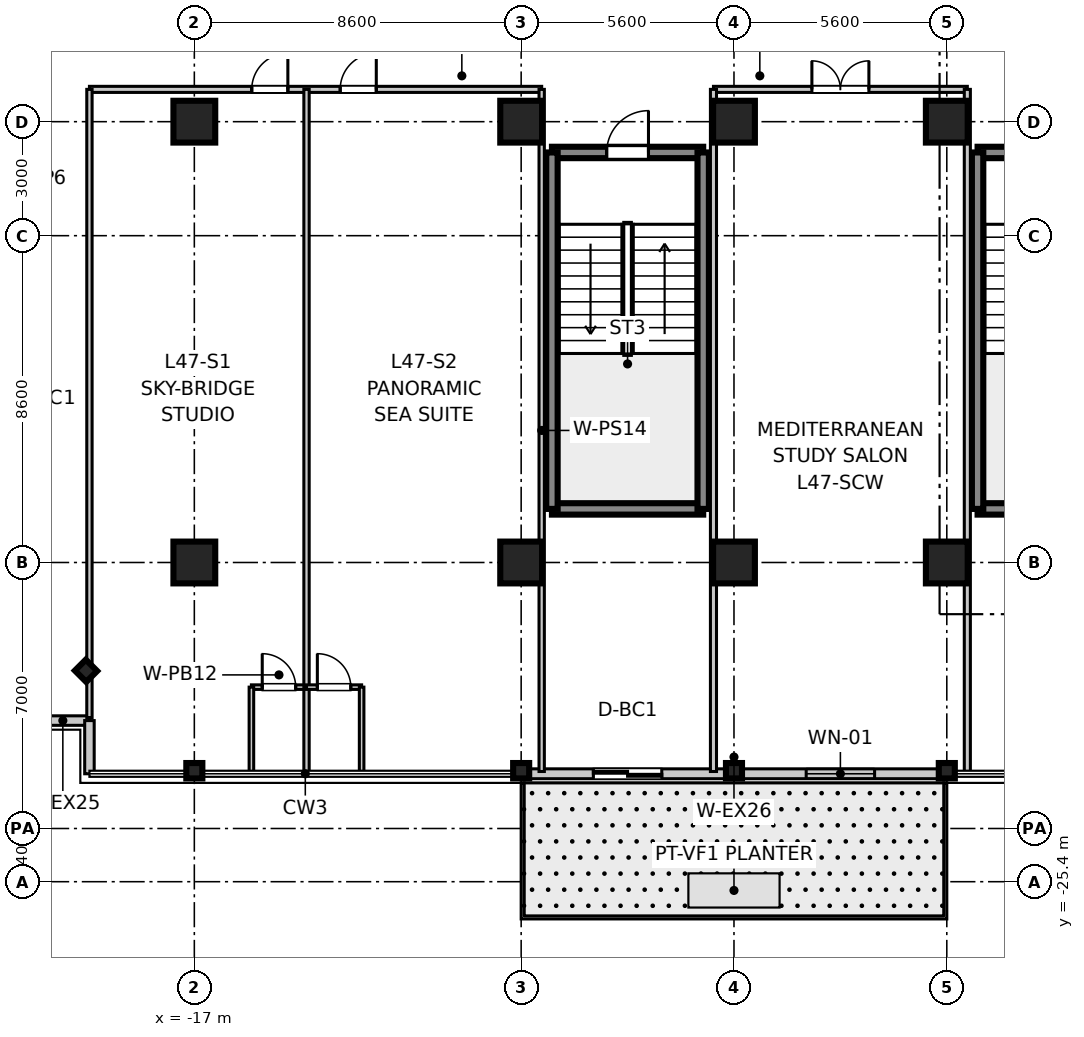
"""IFC4 building model, lengths in metres.
Left out: names, types, materials, properties, quantities, classifications, styles, units other than length and angle.
Written with IfcOpenShell. Run it as: python <this file> out.ifc"""

import sys

from ifc_helpers import new_model, si_unit, direction, frame, frame_2d, origin, origin_2d, place, context, subcontext, project, spatial, rectangle, i_section, extrude, source, transform, mapped, element, fill, save


model = new_model("IFC4")
c1 = context("Model", 3, precision=1e-05, world=origin(), true_north=direction((0.0, 1.0)))
c2 = subcontext(c1, "Body", "Model", "MODEL_VIEW")
j1 = project(units=[si_unit("LENGTHUNIT", "METRE"), si_unit("PLANEANGLEUNIT", "RADIAN")], contexts=[c1])
p1 = place(None, origin())
s1 = spatial("IfcSite", under=j1, at=p1, CompositionType="ELEMENT")
p2 = place(p1, origin())
s2 = spatial("IfcBuilding", under=s1, at=p2, CompositionType="ELEMENT")
p3 = place(p2, frame((0.0, 0.0, 185.5)))
s3 = spatial("IfcBuildingStorey", under=s2, at=p3, CompositionType="ELEMENT", Elevation=185.5)
m1 = source(origin(), c2, "Body", "SweptSolid", [
    extrude(rectangle(XDim=1.1, YDim=1.1, at=origin_2d()), origin(), (0.0, 0.0, 1.0), 3.605),
])
for number, where, z_axis, x_axis in (
    (1, (-17.0, -17.0, 0.0), (0.0, 0.0, 1.0), (1.0, 0.0, 0.0)),
    (2, (-17.0, -5.4, 0.0), (0.0, 0.0, 1.0), (1.0, 0.0, 0.0)),
    (3, (-8.4, -17.0, 0.0), (0.0, 0.0, 1.0), (1.0, 0.0, 0.0)),
    (4, (-8.4, -5.4, 0.0), (0.0, 0.0, 1.0), (1.0, 0.0, 0.0)),
    (5, (-2.8, -17.0, 0.0), (0.0, 0.0, 1.0), (1.0, 0.0, 0.0)),
    (6, (-2.8, -5.4, 0.0), (0.0, 0.0, 1.0), (1.0, 0.0, 0.0)),
    (7, (2.8, -17.0, 0.0), (0.0, 0.0, 1.0), (1.0, 0.0, 0.0)),
    (8, (2.8, -5.4, 0.0), (0.0, 0.0, 1.0), (1.0, 0.0, 0.0)),
):
    element("IfcColumn", number, at=place(p3, frame(where, z_axis=z_axis, x_axis=x_axis)), inside=s3, PredefinedType="COLUMN", context=c2, shape_type="MappedRepresentation", body=[
        mapped(m1, transform((0.0, 0.0, 0.0), scale=1.0)),
    ])
m2 = source(origin(), c2, "Body", "SweptSolid", [
    extrude(i_section(OverallWidth=0.406, OverallDepth=0.422, WebThickness=0.019, FlangeThickness=0.03, at=origin_2d()), origin(), (0.0, 0.0, 1.0), 3.605),
])
for number, where, z_axis, x_axis in (
    (9, (-17.0, -22.48, 0.0), (0.0, 0.0, 1.0), (0.0, 1.0, 0.0)),
    (10, (-8.4, -22.48, 0.0), (0.0, 0.0, 1.0), (0.0, 1.0, 0.0)),
    (11, (-2.8, -22.48, 0.0), (0.0, 0.0, 1.0), (0.0, 1.0, 0.0)),
    (12, (2.8, -22.48, 0.0), (0.0, 0.0, 1.0), (0.0, 1.0, 0.0)),
    (13, (-19.85, -19.85, 0.0), (0.0, 0.0, 1.0), (0.707, 0.707, 0.0)),
):
    element("IfcColumn", number, at=place(p3, frame(where, z_axis=z_axis, x_axis=x_axis)), inside=s3, PredefinedType="COLUMN", context=c2, shape_type="MappedRepresentation", body=[
        mapped(m2, transform((0.0, 0.0, 0.0), scale=1.0)),
    ])
m3 = source(origin(), c2, "Body", "SweptSolid", [
    extrude(rectangle(XDim=3.98, YDim=0.3, at=frame_2d((1.99, 0.0))), origin(), (0.0, 0.0, 1.0), 3.39),
])
for number, where, z_axis, x_axis in (
    (14, (3.61, -15.59, 0.0), (0.0, 0.0, 1.0), (1.0, 0.0, 0.0)),
    (15, (3.61, -6.21, 0.0), (0.0, 0.0, 1.0), (1.0, 0.0, 0.0)),
):
    element("IfcWall", number, at=place(p3, frame(where, z_axis=z_axis, x_axis=x_axis)), inside=s3, PredefinedType="SHEAR", context=c2, shape_type="MappedRepresentation", body=[
        mapped(m3, transform((0.0, 0.0, 0.0), scale=1.0)),
    ])
m4 = source(origin(), c2, "Body", "SweptSolid", [
    extrude(rectangle(XDim=9.38, YDim=0.3, at=frame_2d((4.69, 0.0))), origin(), (0.0, 0.0, 1.0), 3.39),
])
p4 = place(p3, frame((3.61, -15.59, 0.0), z_axis=(0.0, 0.0, 1.0), x_axis=(0.0, 1.0, 0.0)))
e16 = element("IfcWall", 16, at=p4, inside=s3, PredefinedType="SHEAR", context=c2, shape_type="MappedRepresentation", body=[
    mapped(m4, transform((0.0, 0.0, 0.0), scale=1.0)),
])
p5 = place(p3, frame((-7.59, -15.59, 0.0), z_axis=(0.0, 0.0, 1.0), x_axis=(1.0, 0.0, 0.0)))
e17 = element("IfcWall", 17, at=p5, inside=s3, PredefinedType="SHEAR", context=c2, shape_type="MappedRepresentation", body=[
    mapped(m3, transform((0.0, 0.0, 0.0), scale=1.0)),
])
p6 = place(p3, frame((-7.59, -6.21, 0.0), z_axis=(0.0, 0.0, 1.0), x_axis=(1.0, 0.0, 0.0)))
e18 = element("IfcWall", 18, at=p6, inside=s3, PredefinedType="SHEAR", context=c2, shape_type="MappedRepresentation", body=[
    mapped(m3, transform((0.0, 0.0, 0.0), scale=1.0)),
])
p7 = place(p6, frame((1.44, 0.0, 0.0)))
e19 = element("IfcOpeningElement", 19, at=p7, cuts=e18, PredefinedType="OPENING", context=c2, shape_type="SweptSolid", body=[
    extrude(rectangle(XDim=1.1, YDim=2.15, at=frame_2d((0.55, 1.075))), frame((0.0, 0.16, 0.0), z_axis=(0.0, -1.0, 0.0), x_axis=(1.0, 0.0, 0.0)), (0.0, 0.0, 1.0), 0.32),
])
for number, where, z_axis, x_axis in (
    (20, (-7.59, -15.59, 0.0), (0.0, 0.0, 1.0), (0.0, 1.0, 0.0)),
    (21, (-3.61, -15.59, 0.0), (0.0, 0.0, 1.0), (0.0, 1.0, 0.0)),
):
    element("IfcWall", number, at=place(p3, frame(where, z_axis=z_axis, x_axis=x_axis)), inside=s3, PredefinedType="SHEAR", context=c2, shape_type="MappedRepresentation", body=[
        mapped(m4, transform((0.0, 0.0, 0.0), scale=1.0)),
    ])
m5 = source(origin(), c2, "Body", "SweptSolid", [
    extrude(rectangle(XDim=1.4, YDim=0.25, at=frame_2d((0.7, 0.0))), origin(), (0.0, 0.0, 1.0), 3.39),
])
p8 = place(p3, frame((-21.16, -21.16, 0.0), z_axis=(0.0, 0.0, 1.0), x_axis=(1.0, 0.0, 0.0)))
e22 = element("IfcWall", 22, at=p8, inside=s3, PredefinedType="STANDARD", context=c2, shape_type="MappedRepresentation", body=[
    mapped(m5, transform((0.0, 0.0, 0.0), scale=1.0)),
])
m6 = source(origin(), c2, "Body", "SweptSolid", [
    extrude(rectangle(XDim=1.4, YDim=0.25, at=frame_2d((0.7, 0.0))), origin(), (0.0, 0.0, 1.0), 3.39),
])
p9 = place(p3, frame((-19.76, -22.56, 0.0), z_axis=(0.0, 0.0, 1.0), x_axis=(0.0, 1.0, 0.0)))
e23 = element("IfcWall", 23, at=p9, inside=s3, PredefinedType="STANDARD", context=c2, shape_type="MappedRepresentation", body=[
    mapped(m6, transform((0.0, 0.0, 0.0), scale=1.0)),
])
m7 = source(origin(), c2, "Body", "SweptSolid", [
    extrude(rectangle(XDim=11.2, YDim=0.26, at=frame_2d((5.6, 0.0))), origin(), (0.0, 0.0, 1.0), 2.87),
])
p10 = place(p3, frame((-8.4, -22.56, 0.0), z_axis=(0.0, 0.0, 1.0), x_axis=(1.0, 0.0, 0.0)))
e24 = element("IfcWall", 24, at=p10, inside=s3, PredefinedType="STANDARD", context=c2, shape_type="MappedRepresentation", body=[
    mapped(m7, transform((0.0, 0.0, 0.0), scale=1.0)),
])
p11 = place(p10, frame((1.9, 0.0, 0.0)))
e25 = element("IfcOpeningElement", 25, at=p11, cuts=e24, PredefinedType="OPENING", context=c2, shape_type="SweptSolid", body=[
    extrude(rectangle(XDim=1.8, YDim=2.25, at=frame_2d((0.9, 1.125))), frame((0.0, 0.14, 0.0), z_axis=(0.0, -1.0, 0.0), x_axis=(1.0, 0.0, 0.0)), (0.0, 0.0, 1.0), 0.28),
])
p12 = place(p10, frame((7.5, 0.0, 0.85)))
e26 = element("IfcOpeningElement", 26, at=p12, cuts=e24, PredefinedType="OPENING", context=c2, shape_type="SweptSolid", body=[
    extrude(rectangle(XDim=1.8, YDim=1.5, at=frame_2d((0.9, 0.75))), frame((0.0, 0.14, 0.0), z_axis=(0.0, -1.0, 0.0), x_axis=(1.0, 0.0, 0.0)), (0.0, 0.0, 1.0), 0.28),
])
m8 = source(origin(), c2, "Body", "SweptSolid", [
    extrude(rectangle(XDim=11.9, YDim=0.16, at=frame_2d((5.95, 0.0))), origin(), (0.0, 0.0, 1.0), 2.73),
])
p13 = place(p3, frame((-19.76, -4.55, 0.0), z_axis=(0.0, 0.0, 1.0), x_axis=(1.0, 0.0, 0.0)))
e27 = element("IfcWall", 27, at=p13, inside=s3, PredefinedType="PARTITIONING", context=c2, shape_type="MappedRepresentation", body=[
    mapped(m8, transform((0.0, 0.0, 0.0), scale=1.0)),
])
p14 = place(p13, frame((4.271, 0.0, 0.0)))
e28 = element("IfcOpeningElement", 28, at=p14, cuts=e27, PredefinedType="OPENING", context=c2, shape_type="SweptSolid", body=[
    extrude(rectangle(XDim=0.95, YDim=2.1, at=frame_2d((0.475, 1.05))), frame((0.0, 0.09, 0.0), z_axis=(0.0, -1.0, 0.0), x_axis=(1.0, 0.0, 0.0)), (0.0, 0.0, 1.0), 0.18),
])
p15 = place(p13, frame((6.598, 0.0, 0.0)))
e29 = element("IfcOpeningElement", 29, at=p15, cuts=e27, PredefinedType="OPENING", context=c2, shape_type="SweptSolid", body=[
    extrude(rectangle(XDim=0.95, YDim=2.1, at=frame_2d((0.475, 1.05))), frame((0.0, 0.09, 0.0), z_axis=(0.0, -1.0, 0.0), x_axis=(1.0, 0.0, 0.0)), (0.0, 0.0, 1.0), 0.18),
])
m9 = source(origin(), c2, "Body", "SweptSolid", [
    extrude(rectangle(XDim=16.53, YDim=0.14, at=frame_2d((8.265, 0.0))), origin(), (0.0, 0.0, 1.0), 2.73),
])
p16 = place(p3, frame((-19.76, -21.08, 0.0), z_axis=(0.0, 0.0, 1.0), x_axis=(0.0, 1.0, 0.0)))
e30 = element("IfcWall", 30, at=p16, inside=s3, PredefinedType="PARTITIONING", context=c2, shape_type="MappedRepresentation", body=[
    mapped(m9, transform((0.0, 0.0, 0.0), scale=1.0)),
])
m10 = source(origin(), c2, "Body", "SweptSolid", [
    extrude(rectangle(XDim=17.95, YDim=0.14, at=frame_2d((8.975, 0.0))), origin(), (0.0, 0.0, 1.0), 2.73),
])
p17 = place(p3, frame((-7.86, -22.5, 0.0), z_axis=(0.0, 0.0, 1.0), x_axis=(0.0, 1.0, 0.0)))
e31 = element("IfcWall", 31, at=p17, inside=s3, PredefinedType="PARTITIONING", context=c2, shape_type="MappedRepresentation", body=[
    mapped(m10, transform((0.0, 0.0, 0.0), scale=1.0)),
])
m11 = source(origin(), c2, "Body", "SweptSolid", [
    extrude(rectangle(XDim=1.45, YDim=0.12, at=frame_2d((0.725, 0.0))), origin(), (0.0, 0.0, 1.0), 2.73),
])
p18 = place(p3, frame((-15.498, -20.28, 0.0), z_axis=(0.0, 0.0, 1.0), x_axis=(1.0, 0.0, 0.0)))
e32 = element("IfcWall", 32, at=p18, inside=s3, PredefinedType="PARTITIONING", context=c2, shape_type="MappedRepresentation", body=[
    mapped(m11, transform((0.0, 0.0, 0.0), scale=1.0)),
])
p19 = place(p18, frame((0.285, 0.0, 0.0)))
e33 = element("IfcOpeningElement", 33, at=p19, cuts=e32, PredefinedType="OPENING", context=c2, shape_type="SweptSolid", body=[
    extrude(rectangle(XDim=0.88, YDim=2.1, at=frame_2d((0.44, 1.05))), frame((0.0, 0.07, 0.0), z_axis=(0.0, -1.0, 0.0), x_axis=(1.0, 0.0, 0.0)), (0.0, 0.0, 1.0), 0.14),
])
m12 = source(origin(), c2, "Body", "SweptSolid", [
    extrude(rectangle(XDim=2.22, YDim=0.12, at=frame_2d((1.11, 0.0))), origin(), (0.0, 0.0, 1.0), 2.73),
])
p20 = place(p3, frame((-15.498, -22.5, 0.0), z_axis=(0.0, 0.0, 1.0), x_axis=(0.0, 1.0, 0.0)))
e34 = element("IfcWall", 34, at=p20, inside=s3, PredefinedType="PARTITIONING", context=c2, shape_type="MappedRepresentation", body=[
    mapped(m12, transform((0.0, 0.0, 0.0), scale=1.0)),
])
p21 = place(p3, frame((-14.048, -22.5, 0.0), z_axis=(0.0, 0.0, 1.0), x_axis=(0.0, 1.0, 0.0)))
e35 = element("IfcWall", 35, at=p21, inside=s3, PredefinedType="PARTITIONING", context=c2, shape_type="MappedRepresentation", body=[
    mapped(m10, transform((0.0, 0.0, 0.0), scale=1.0)),
])
m13 = source(origin(), c2, "Body", "SweptSolid", [
    extrude(rectangle(XDim=1.45, YDim=0.12, at=frame_2d((0.725, 0.0))), origin(), (0.0, 0.0, 1.0), 2.73),
])
p22 = place(p3, frame((-14.048, -20.28, 0.0), z_axis=(0.0, 0.0, 1.0), x_axis=(1.0, 0.0, 0.0)))
e36 = element("IfcWall", 36, at=p22, inside=s3, PredefinedType="PARTITIONING", context=c2, shape_type="MappedRepresentation", body=[
    mapped(m13, transform((0.0, 0.0, 0.0), scale=1.0)),
])
p23 = place(p22, frame((0.285, 0.0, 0.0)))
e37 = element("IfcOpeningElement", 37, at=p23, cuts=e36, PredefinedType="OPENING", context=c2, shape_type="SweptSolid", body=[
    extrude(rectangle(XDim=0.88, YDim=2.1, at=frame_2d((0.44, 1.05))), frame((0.0, 0.07, 0.0), z_axis=(0.0, -1.0, 0.0), x_axis=(1.0, 0.0, 0.0)), (0.0, 0.0, 1.0), 0.14),
])
p24 = place(p3, frame((-12.598, -22.5, 0.0), z_axis=(0.0, 0.0, 1.0), x_axis=(0.0, 1.0, 0.0)))
e38 = element("IfcWall", 38, at=p24, inside=s3, PredefinedType="PARTITIONING", context=c2, shape_type="MappedRepresentation", body=[
    mapped(m12, transform((0.0, 0.0, 0.0), scale=1.0)),
])
m14 = source(origin(), c2, "Body", "SweptSolid", [
    extrude(rectangle(XDim=6.68, YDim=0.16, at=frame_2d((3.34, 0.0))), origin(), (0.0, 0.0, 1.0), 2.73),
])
p25 = place(p3, frame((-3.34, -4.55, 0.0), z_axis=(0.0, 0.0, 1.0), x_axis=(1.0, 0.0, 0.0)))
e39 = element("IfcWall", 39, at=p25, inside=s3, PredefinedType="PARTITIONING", context=c2, shape_type="MappedRepresentation", body=[
    mapped(m14, transform((0.0, 0.0, 0.0), scale=1.0)),
])
p26 = place(p25, frame((2.59, 0.0, 0.0)))
e40 = element("IfcOpeningElement", 40, at=p26, cuts=e39, PredefinedType="OPENING", context=c2, shape_type="SweptSolid", body=[
    extrude(rectangle(XDim=1.5, YDim=2.15, at=frame_2d((0.75, 1.075))), frame((0.0, 0.09, 0.0), z_axis=(0.0, -1.0, 0.0), x_axis=(1.0, 0.0, 0.0)), (0.0, 0.0, 1.0), 0.18),
])
m15 = source(origin(), c2, "Body", "SweptSolid", [
    extrude(rectangle(XDim=17.95, YDim=0.16, at=frame_2d((8.975, 0.0))), origin(), (0.0, 0.0, 1.0), 2.73),
])
for number, where, z_axis, x_axis in (
    (41, (-3.34, -22.5, 0.0), (0.0, 0.0, 1.0), (0.0, 1.0, 0.0)),
    (42, (3.34, -22.5, 0.0), (0.0, 0.0, 1.0), (0.0, 1.0, 0.0)),
):
    element("IfcWall", number, at=place(p3, frame(where, z_axis=z_axis, x_axis=x_axis)), inside=s3, PredefinedType="PARTITIONING", context=c2, shape_type="MappedRepresentation", body=[
        mapped(m15, transform((0.0, 0.0, 0.0), scale=1.0)),
    ])
m16 = source(origin(), c2, "Body", "SweptSolid", [
    extrude(rectangle(XDim=1.1, YDim=2.15, at=frame_2d((0.55, 1.075))), frame((0.0, 0.025, 0.0), z_axis=(0.0, -1.0, 0.0), x_axis=(1.0, 0.0, 0.0)), (0.0, 0.0, 1.0), 0.05),
])
p27 = place(p7, frame((1.1, 0.0, 0.0), z_axis=(0.0, 0.0, 1.0), x_axis=(-1.0, 0.0, 0.0)))
e43 = element("IfcDoor", 43, at=p27, inside=s3, OperationType="SINGLE_SWING_RIGHT", PredefinedType="DOOR", context=c2, shape_type="MappedRepresentation", body=[
    mapped(m16, transform((0.0, 0.0, 0.0), scale=1.0)),
])
fill(e19, e43)
m17 = source(origin(), c2, "Body", "SweptSolid", [
    extrude(rectangle(XDim=0.88, YDim=2.1, at=frame_2d((0.44, 1.05))), frame((0.0, 0.025, 0.0), z_axis=(0.0, -1.0, 0.0), x_axis=(1.0, 0.0, 0.0)), (0.0, 0.0, 1.0), 0.05),
])
p28 = place(p19, frame((0.88, 0.0, 0.0), z_axis=(0.0, 0.0, 1.0), x_axis=(-1.0, 0.0, 0.0)))
e44 = element("IfcDoor", 44, at=p28, inside=s3, OperationType="SINGLE_SWING_LEFT", PredefinedType="DOOR", context=c2, shape_type="MappedRepresentation", body=[
    mapped(m17, transform((0.0, 0.0, 0.0), scale=1.0)),
])
fill(e33, e44)
m18 = source(origin(), c2, "Body", "SweptSolid", [
    extrude(rectangle(XDim=0.95, YDim=2.1, at=frame_2d((0.475, 1.05))), frame((0.0, 0.025, 0.0), z_axis=(0.0, -1.0, 0.0), x_axis=(1.0, 0.0, 0.0)), (0.0, 0.0, 1.0), 0.05),
])
p29 = place(p14, frame((0.95, 0.0, 0.0), z_axis=(0.0, 0.0, 1.0), x_axis=(-1.0, 0.0, 0.0)))
e45 = element("IfcDoor", 45, at=p29, inside=s3, OperationType="SINGLE_SWING_RIGHT", PredefinedType="DOOR", context=c2, shape_type="MappedRepresentation", body=[
    mapped(m18, transform((0.0, 0.0, 0.0), scale=1.0)),
])
fill(e28, e45)
p30 = place(p23, frame((0.88, 0.0, 0.0), z_axis=(0.0, 0.0, 1.0), x_axis=(-1.0, 0.0, 0.0)))
e46 = element("IfcDoor", 46, at=p30, inside=s3, OperationType="SINGLE_SWING_LEFT", PredefinedType="DOOR", context=c2, shape_type="MappedRepresentation", body=[
    mapped(m17, transform((0.0, 0.0, 0.0), scale=1.0)),
])
fill(e37, e46)
p31 = place(p15, frame((0.95, 0.0, 0.0), z_axis=(0.0, 0.0, 1.0), x_axis=(-1.0, 0.0, 0.0)))
e47 = element("IfcDoor", 47, at=p31, inside=s3, OperationType="SINGLE_SWING_RIGHT", PredefinedType="DOOR", context=c2, shape_type="MappedRepresentation", body=[
    mapped(m18, transform((0.0, 0.0, 0.0), scale=1.0)),
])
fill(e29, e47)
m19 = source(origin(), c2, "Body", "SweptSolid", [
    extrude(rectangle(XDim=1.5, YDim=2.15, at=frame_2d((0.75, 1.075))), frame((0.0, 0.025, 0.0), z_axis=(0.0, -1.0, 0.0), x_axis=(1.0, 0.0, 0.0)), (0.0, 0.0, 1.0), 0.05),
])
p32 = place(p26, frame((1.5, 0.0, 0.0), z_axis=(0.0, 0.0, 1.0), x_axis=(-1.0, 0.0, 0.0)))
e48 = element("IfcDoor", 48, at=p32, inside=s3, OperationType="DOUBLE_DOOR_SINGLE_SWING", PredefinedType="DOOR", context=c2, shape_type="MappedRepresentation", body=[
    mapped(m19, transform((0.0, 0.0, 0.0), scale=1.0)),
])
fill(e40, e48)
m20 = source(origin(), c2, "Body", "SweptSolid", [
    extrude(rectangle(XDim=1.8, YDim=2.25, at=frame_2d((0.9, 1.125))), frame((0.0, 0.025, 0.0), z_axis=(0.0, -1.0, 0.0), x_axis=(1.0, 0.0, 0.0)), (0.0, 0.0, 1.0), 0.05),
])
p33 = place(p11, frame((1.8, 0.0, 0.0), z_axis=(0.0, 0.0, 1.0), x_axis=(-1.0, 0.0, 0.0)))
e49 = element("IfcDoor", 49, at=p33, inside=s3, OperationType="DOUBLE_DOOR_SLIDING", PredefinedType="DOOR", context=c2, shape_type="MappedRepresentation", body=[
    mapped(m20, transform((0.0, 0.0, 0.0), scale=1.0)),
])
fill(e25, e49)
m21 = source(origin(), c2, "Body", "SweptSolid", [
    extrude(rectangle(XDim=1.8, YDim=1.5, at=frame_2d((0.9, 0.75))), frame((0.0, 0.03, 0.0), z_axis=(0.0, -1.0, 0.0), x_axis=(1.0, 0.0, 0.0)), (0.0, 0.0, 1.0), 0.06),
])
p34 = place(p12, origin())
e50 = element("IfcWindow", 50, at=p34, inside=s3, PartitioningType="SINGLE_PANEL", PredefinedType="WINDOW", context=c2, shape_type="MappedRepresentation", body=[
    mapped(m21, transform((0.0, 0.0, 0.0), scale=1.0)),
])
fill(e26, e50)
save(model, sys.argv[1])
